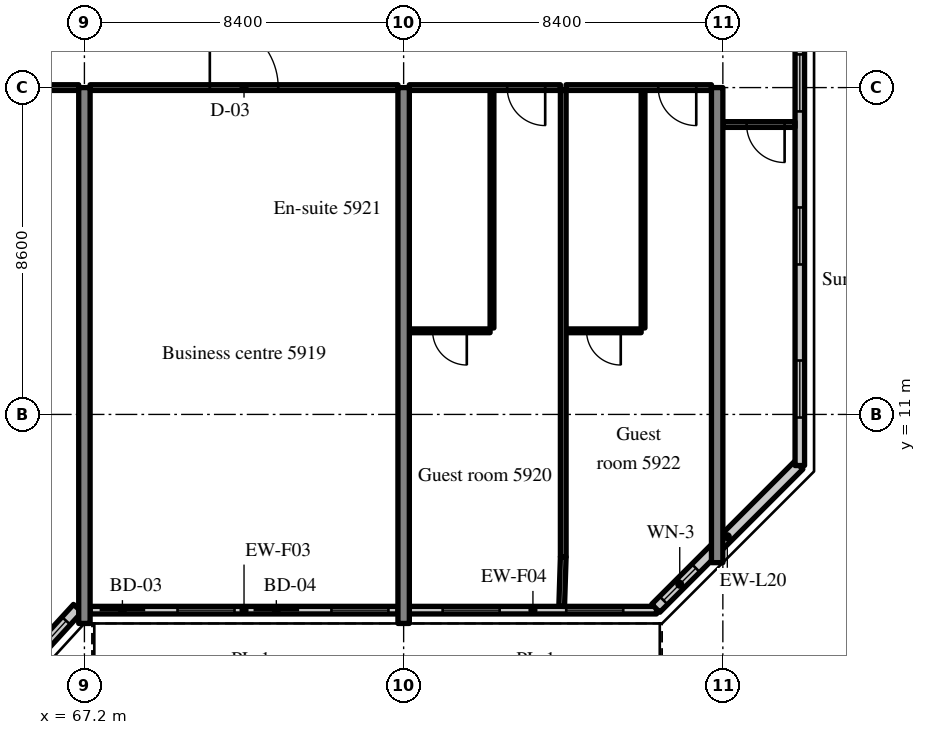
"""IFC4 building model, lengths in metres.
Left out: names, types, materials, properties, quantities, classifications, styles, units other than length and angle.
Written with IfcOpenShell. Run it as: python <this file> out.ifc"""

import sys

from ifc_helpers import new_model, si_unit, direction, frame, frame_2d, origin, place, context, subcontext, project, spatial, rectangle, extrude, source, transform, mapped, element, fill, save


model = new_model("IFC4")
c1 = context("Model", 3, precision=1e-05, world=origin(), true_north=direction((0.0, 1.0)))
c2 = subcontext(c1, "Body", "Model", "MODEL_VIEW")
j1 = project(units=[si_unit("LENGTHUNIT", "METRE"), si_unit("PLANEANGLEUNIT", "RADIAN")], contexts=[c1])
p1 = place(None, origin())
s1 = spatial("IfcSite", under=j1, at=p1, CompositionType="ELEMENT")
p2 = place(p1, origin())
s2 = spatial("IfcBuilding", under=s1, at=p2, CompositionType="ELEMENT")
p3 = place(p2, frame((0.0, 0.0, 245.2)))
s3 = spatial("IfcBuildingStorey", under=s2, at=p3, CompositionType="ELEMENT", Elevation=245.2)
m1 = source(origin(), c2, "Body", "SweptSolid", [
    extrude(rectangle(XDim=14.1, YDim=0.3, at=frame_2d((7.05, 0.0))), origin(), (0.0, 0.0, 1.0), 3.62),
])
for number, where, z_axis, x_axis in (
    (1, (67.2, 5.5, 0.0), (0.0, 0.0, 1.0), (0.0, 1.0, 0.0)),
    (2, (75.6, 5.5, 0.0), (0.0, 0.0, 1.0), (0.0, 1.0, 0.0)),
):
    element("IfcWall", number, at=place(p3, frame(where, z_axis=z_axis, x_axis=x_axis)), inside=s3, PredefinedType="SHEAR", context=c2, shape_type="MappedRepresentation", body=[
        mapped(m1, transform((0.0, 0.0, 0.0), scale=1.0)),
    ])
m2 = source(origin(), c2, "Body", "SweptSolid", [
    extrude(rectangle(XDim=12.5, YDim=0.3, at=frame_2d((6.25, 0.0))), origin(), (0.0, 0.0, 1.0), 3.62),
])
p4 = place(p3, frame((83.85, 7.1, 0.0), z_axis=(0.0, 0.0, 1.0), x_axis=(0.0, 1.0, 0.0)))
e3 = element("IfcWall", 3, at=p4, inside=s3, PredefinedType="SHEAR", context=c2, shape_type="MappedRepresentation", body=[
    mapped(m2, transform((0.0, 0.0, 0.0), scale=1.0)),
])
m3 = source(origin(), c2, "Body", "SweptSolid", [
    extrude(rectangle(XDim=2.398, YDim=0.3, at=frame_2d((1.199, 0.0))), origin(), (0.0, 0.0, 1.0), 3.62),
])
p5 = place(p3, frame((65.404, 4.131, 0.0), z_axis=(0.0, 0.0, 1.0), x_axis=(0.675374189419, 0.737475222815, 0.0)))
e4 = element("IfcWall", 4, at=p5, inside=s3, PredefinedType="SOLIDWALL", context=c2, shape_type="MappedRepresentation", body=[
    mapped(m3, transform((0.0, 0.0, 0.0), scale=1.0)),
])
m4 = source(origin(), c2, "Body", "SweptSolid", [
    extrude(rectangle(XDim=1.5, YDim=2.0, at=frame_2d((0.75, 1.0))), frame((0.0, 0.16, 0.0), z_axis=(0.0, -1.0, 0.0), x_axis=(1.0, 0.0, 0.0)), (0.0, 0.0, 1.0), 0.32),
])
p6 = place(p5, frame((0.449, 0.0, 0.9)))
e5 = element("IfcOpeningElement", 5, at=p6, cuts=e4, PredefinedType="OPENING", context=c2, shape_type="MappedRepresentation", body=[
    mapped(m4, transform((0.0, 0.0, 0.0), scale=1.0)),
])
m5 = source(origin(), c2, "Body", "SweptSolid", [
    extrude(rectangle(XDim=8.1, YDim=0.2, at=frame_2d((4.05, 0.0))), origin(), (0.0, 0.0, 1.0), 3.02),
])
p7 = place(p3, frame((67.35, 5.85, 0.0), z_axis=(0.0, 0.0, 1.0), x_axis=(1.0, 0.0, 0.0)))
e6 = element("IfcWall", 6, at=p7, inside=s3, PredefinedType="SOLIDWALL", context=c2, shape_type="MappedRepresentation", body=[
    mapped(m5, transform((0.0, 0.0, 0.0), scale=1.0)),
])
m6 = source(origin(), c2, "Body", "SweptSolid", [
    extrude(rectangle(XDim=1.2, YDim=2.4, at=frame_2d((0.6, 1.2))), frame((0.0, 0.11, 0.0), z_axis=(0.0, -1.0, 0.0), x_axis=(1.0, 0.0, 0.0)), (0.0, 0.0, 1.0), 0.22),
])
p8 = place(p7, frame((0.25, 0.0, 0.0)))
e7 = element("IfcOpeningElement", 7, at=p8, cuts=e6, PredefinedType="OPENING", context=c2, shape_type="MappedRepresentation", body=[
    mapped(m6, transform((0.0, 0.0, 0.0), scale=1.0)),
])
m7 = source(origin(), c2, "Body", "SweptSolid", [
    extrude(rectangle(XDim=1.5, YDim=1.5, at=frame_2d((0.75, 0.75))), frame((0.0, 0.11, 0.0), z_axis=(0.0, -1.0, 0.0), x_axis=(1.0, 0.0, 0.0)), (0.0, 0.0, 1.0), 0.22),
])
p9 = place(p7, frame((2.3, 0.0, 0.9)))
e8 = element("IfcOpeningElement", 8, at=p9, cuts=e6, PredefinedType="OPENING", context=c2, shape_type="MappedRepresentation", body=[
    mapped(m7, transform((0.0, 0.0, 0.0), scale=1.0)),
])
p10 = place(p7, frame((4.3, 0.0, 0.0)))
e9 = element("IfcOpeningElement", 9, at=p10, cuts=e6, PredefinedType="OPENING", context=c2, shape_type="MappedRepresentation", body=[
    mapped(m6, transform((0.0, 0.0, 0.0), scale=1.0)),
])
p11 = place(p7, frame((6.35, 0.0, 0.9)))
e10 = element("IfcOpeningElement", 10, at=p11, cuts=e6, PredefinedType="OPENING", context=c2, shape_type="MappedRepresentation", body=[
    mapped(m7, transform((0.0, 0.0, 0.0), scale=1.0)),
])
m8 = source(origin(), c2, "Body", "SweptSolid", [
    extrude(rectangle(XDim=6.505, YDim=0.2, at=frame_2d((3.252, 0.0))), origin(), (0.0, 0.0, 1.0), 3.02),
])
p12 = place(p3, frame((75.75, 5.85, 0.0), z_axis=(0.0, 0.0, 1.0), x_axis=(1.0, 0.0, 0.0)))
e11 = element("IfcWall", 11, at=p12, inside=s3, PredefinedType="SOLIDWALL", context=c2, shape_type="MappedRepresentation", body=[
    mapped(m8, transform((0.0, 0.0, 0.0), scale=1.0)),
])
p13 = place(p12, frame((0.876, 0.0, 0.9)))
e12 = element("IfcOpeningElement", 12, at=p13, cuts=e11, PredefinedType="OPENING", context=c2, shape_type="MappedRepresentation", body=[
    mapped(m7, transform((0.0, 0.0, 0.0), scale=1.0)),
])
p14 = place(p12, frame((4.129, 0.0, 0.9)))
e13 = element("IfcOpeningElement", 13, at=p14, cuts=e11, PredefinedType="OPENING", context=c2, shape_type="MappedRepresentation", body=[
    mapped(m7, transform((0.0, 0.0, 0.0), scale=1.0)),
])
m9 = source(origin(), c2, "Body", "SweptSolid", [
    extrude(rectangle(XDim=5.326, YDim=0.3, at=frame_2d((2.663, 0.0))), origin(), (0.0, 0.0, 1.0), 3.62),
])
p15 = place(p3, frame((82.234, 5.9, 0.0), z_axis=(0.0, 0.0, 1.0), x_axis=(0.707083859269, 0.707129702361, 0.0)))
e14 = element("IfcWall", 14, at=p15, inside=s3, PredefinedType="SOLIDWALL", context=c2, shape_type="MappedRepresentation", body=[
    mapped(m9, transform((0.0, 0.0, 0.0), scale=1.0)),
])
m10 = source(origin(), c2, "Body", "SweptSolid", [
    extrude(rectangle(XDim=1.2, YDim=1.5, at=frame_2d((0.6, 0.75))), frame((0.0, 0.16, 0.0), z_axis=(0.0, -1.0, 0.0), x_axis=(1.0, 0.0, 0.0)), (0.0, 0.0, 1.0), 0.32),
])
p16 = place(p15, frame((0.292, 0.0, 0.9)))
e15 = element("IfcOpeningElement", 15, at=p16, cuts=e14, PredefinedType="OPENING", context=c2, shape_type="MappedRepresentation", body=[
    mapped(m10, transform((0.0, 0.0, 0.0), scale=1.0)),
])
m11 = source(origin(), c2, "Body", "SweptSolid", [
    extrude(rectangle(XDim=28.189, YDim=0.25, at=frame_2d((14.095, 0.0))), origin(), (0.0, 0.0, 1.0), 3.62),
])
p17 = place(p3, frame((86.025, 9.655, 0.0), z_axis=(0.0, 0.0, 1.0), x_axis=(0.0, 1.0, 0.0)))
e16 = element("IfcWall", 16, at=p17, inside=s3, PredefinedType="SOLIDWALL", context=c2, shape_type="MappedRepresentation", body=[
    mapped(m11, transform((0.0, 0.0, 0.0), scale=1.0)),
])
m12 = source(origin(), c2, "Body", "SweptSolid", [
    extrude(rectangle(XDim=1.5, YDim=1.5, at=frame_2d((0.75, 0.75))), frame((0.0, 0.135, 0.0), z_axis=(0.0, -1.0, 0.0), x_axis=(1.0, 0.0, 0.0)), (0.0, 0.0, 1.0), 0.27),
])
p18 = place(p17, frame((1.263, 0.0, 0.9)))
e17 = element("IfcOpeningElement", 17, at=p18, cuts=e16, PredefinedType="OPENING", context=c2, shape_type="MappedRepresentation", body=[
    mapped(m12, transform((0.0, 0.0, 0.0), scale=1.0)),
])
p19 = place(p17, frame((5.291, 0.0, 0.9)))
e18 = element("IfcOpeningElement", 18, at=p19, cuts=e16, PredefinedType="OPENING", context=c2, shape_type="MappedRepresentation", body=[
    mapped(m12, transform((0.0, 0.0, 0.0), scale=1.0)),
])
p20 = place(p17, frame((9.318, 0.0, 0.9)))
e19 = element("IfcOpeningElement", 19, at=p20, cuts=e16, PredefinedType="OPENING", context=c2, shape_type="MappedRepresentation", body=[
    mapped(m12, transform((0.0, 0.0, 0.0), scale=1.0)),
])
p21 = place(p17, frame((13.345, 0.0, 0.9)))
e20 = element("IfcOpeningElement", 20, at=p21, cuts=e16, PredefinedType="OPENING", context=c2, shape_type="MappedRepresentation", body=[
    mapped(m12, transform((0.0, 0.0, 0.0), scale=1.0)),
])
p22 = place(p17, frame((17.372, 0.0, 0.9)))
e21 = element("IfcOpeningElement", 21, at=p22, cuts=e16, PredefinedType="OPENING", context=c2, shape_type="MappedRepresentation", body=[
    mapped(m12, transform((0.0, 0.0, 0.0), scale=1.0)),
])
p23 = place(p17, frame((21.399, 0.0, 0.9)))
e22 = element("IfcOpeningElement", 22, at=p23, cuts=e16, PredefinedType="OPENING", context=c2, shape_type="MappedRepresentation", body=[
    mapped(m12, transform((0.0, 0.0, 0.0), scale=1.0)),
])
p24 = place(p17, frame((25.426, 0.0, 0.9)))
e23 = element("IfcOpeningElement", 23, at=p24, cuts=e16, PredefinedType="OPENING", context=c2, shape_type="MappedRepresentation", body=[
    mapped(m12, transform((0.0, 0.0, 0.0), scale=1.0)),
])
m13 = source(origin(), c2, "Body", "SweptSolid", [
    extrude(rectangle(XDim=3.975, YDim=0.15, at=frame_2d((1.988, 0.0))), origin(), (0.0, 0.0, 1.0), 2.92),
])
p25 = place(p3, frame((63.075, 19.6, 0.0), z_axis=(0.0, 0.0, 1.0), x_axis=(1.0, 0.0, 0.0)))
e24 = element("IfcWall", 24, at=p25, inside=s3, PredefinedType="PARTITIONING", context=c2, shape_type="MappedRepresentation", body=[
    mapped(m13, transform((0.0, 0.0, 0.0), scale=1.0)),
])
m14 = source(origin(), c2, "Body", "SweptSolid", [
    extrude(rectangle(XDim=1.0, YDim=2.1, at=frame_2d((0.5, 1.05))), frame((0.0, 0.085, 0.0), z_axis=(0.0, -1.0, 0.0), x_axis=(1.0, 0.0, 0.0)), (0.0, 0.0, 1.0), 0.17),
])
p26 = place(p25, frame((1.487, 0.0, 0.0)))
e25 = element("IfcOpeningElement", 25, at=p26, cuts=e24, PredefinedType="OPENING", context=c2, shape_type="MappedRepresentation", body=[
    mapped(m14, transform((0.0, 0.0, 0.0), scale=1.0)),
])
m15 = source(origin(), c2, "Body", "SweptSolid", [
    extrude(rectangle(XDim=8.1, YDim=0.15, at=frame_2d((4.05, 0.0))), origin(), (0.0, 0.0, 1.0), 2.92),
])
p27 = place(p3, frame((67.35, 19.6, 0.0), z_axis=(0.0, 0.0, 1.0), x_axis=(1.0, 0.0, 0.0)))
e26 = element("IfcWall", 26, at=p27, inside=s3, PredefinedType="PARTITIONING", context=c2, shape_type="MappedRepresentation", body=[
    mapped(m15, transform((0.0, 0.0, 0.0), scale=1.0)),
])
m16 = source(origin(), c2, "Body", "SweptSolid", [
    extrude(rectangle(XDim=1.8, YDim=2.1, at=frame_2d((0.9, 1.05))), frame((0.0, 0.085, 0.0), z_axis=(0.0, -1.0, 0.0), x_axis=(1.0, 0.0, 0.0)), (0.0, 0.0, 1.0), 0.17),
])
p28 = place(p27, frame((3.15, 0.0, 0.0)))
e27 = element("IfcOpeningElement", 27, at=p28, cuts=e26, PredefinedType="OPENING", context=c2, shape_type="MappedRepresentation", body=[
    mapped(m16, transform((0.0, 0.0, 0.0), scale=1.0)),
])
m17 = source(origin(), c2, "Body", "SweptSolid", [
    extrude(rectangle(XDim=6.25, YDim=0.1, at=frame_2d((3.125, 0.0))), origin(), (0.0, 0.0, 1.0), 3.62),
])
p29 = place(p3, frame((77.925, 13.275, 0.0), z_axis=(0.0, 0.0, 1.0), x_axis=(0.0, 1.0, 0.0)))
e28 = element("IfcWall", 28, at=p29, inside=s3, PredefinedType="PARTITIONING", context=c2, shape_type="MappedRepresentation", body=[
    mapped(m17, transform((0.0, 0.0, 0.0), scale=1.0)),
])
m18 = source(origin(), c2, "Body", "SweptSolid", [
    extrude(rectangle(XDim=2.125, YDim=0.1, at=frame_2d((1.062, 0.0))), origin(), (0.0, 0.0, 1.0), 3.62),
])
p30 = place(p3, frame((75.75, 13.2, 0.0), z_axis=(0.0, 0.0, 1.0), x_axis=(1.0, 0.0, 0.0)))
e29 = element("IfcWall", 29, at=p30, inside=s3, PredefinedType="PARTITIONING", context=c2, shape_type="MappedRepresentation", body=[
    mapped(m18, transform((0.0, 0.0, 0.0), scale=1.0)),
])
m19 = source(origin(), c2, "Body", "SweptSolid", [
    extrude(rectangle(XDim=0.9, YDim=2.1, at=frame_2d((0.45, 1.05))), frame((0.0, 0.06, 0.0), z_axis=(0.0, -1.0, 0.0), x_axis=(1.0, 0.0, 0.0)), (0.0, 0.0, 1.0), 0.12),
])
p31 = place(p30, frame((0.612, 0.0, 0.0)))
e30 = element("IfcOpeningElement", 30, at=p31, cuts=e29, PredefinedType="OPENING", context=c2, shape_type="MappedRepresentation", body=[
    mapped(m19, transform((0.0, 0.0, 0.0), scale=1.0)),
])
p32 = place(p3, frame((75.75, 19.6, 0.0), z_axis=(0.0, 0.0, 1.0), x_axis=(1.0, 0.0, 0.0)))
e31 = element("IfcWall", 31, at=p32, inside=s3, PredefinedType="PARTITIONING", context=c2, shape_type="MappedRepresentation", body=[
    mapped(m13, transform((0.0, 0.0, 0.0), scale=1.0)),
])
p33 = place(p32, frame((2.575, 0.0, 0.0)))
e32 = element("IfcOpeningElement", 32, at=p33, cuts=e31, PredefinedType="OPENING", context=c2, shape_type="MappedRepresentation", body=[
    mapped(m14, transform((0.0, 0.0, 0.0), scale=1.0)),
])
p34 = place(p3, frame((81.9, 13.275, 0.0), z_axis=(0.0, 0.0, 1.0), x_axis=(0.0, 1.0, 0.0)))
e33 = element("IfcWall", 33, at=p34, inside=s3, PredefinedType="PARTITIONING", context=c2, shape_type="MappedRepresentation", body=[
    mapped(m17, transform((0.0, 0.0, 0.0), scale=1.0)),
])
m20 = source(origin(), c2, "Body", "SweptSolid", [
    extrude(rectangle(XDim=1.975, YDim=0.1, at=frame_2d((0.988, 0.0))), origin(), (0.0, 0.0, 1.0), 3.62),
])
p35 = place(p3, frame((79.875, 13.2, 0.0), z_axis=(0.0, 0.0, 1.0), x_axis=(1.0, 0.0, 0.0)))
e34 = element("IfcWall", 34, at=p35, inside=s3, PredefinedType="PARTITIONING", context=c2, shape_type="MappedRepresentation", body=[
    mapped(m20, transform((0.0, 0.0, 0.0), scale=1.0)),
])
p36 = place(p35, frame((0.538, 0.0, 0.0)))
e35 = element("IfcOpeningElement", 35, at=p36, cuts=e34, PredefinedType="OPENING", context=c2, shape_type="MappedRepresentation", body=[
    mapped(m19, transform((0.0, 0.0, 0.0), scale=1.0)),
])
m21 = source(origin(), c2, "Body", "SweptSolid", [
    extrude(rectangle(XDim=3.825, YDim=0.15, at=frame_2d((1.913, 0.0))), origin(), (0.0, 0.0, 1.0), 2.92),
])
p37 = place(p3, frame((79.875, 19.6, 0.0), z_axis=(0.0, 0.0, 1.0), x_axis=(1.0, 0.0, 0.0)))
e36 = element("IfcWall", 36, at=p37, inside=s3, PredefinedType="PARTITIONING", context=c2, shape_type="MappedRepresentation", body=[
    mapped(m21, transform((0.0, 0.0, 0.0), scale=1.0)),
])
p38 = place(p37, frame((2.425, 0.0, 0.0)))
e37 = element("IfcOpeningElement", 37, at=p38, cuts=e36, PredefinedType="OPENING", context=c2, shape_type="MappedRepresentation", body=[
    mapped(m14, transform((0.0, 0.0, 0.0), scale=1.0)),
])
m22 = source(origin(), c2, "Body", "SweptSolid", [
    extrude(rectangle(XDim=12.275, YDim=0.15, at=frame_2d((6.137, 0.0))), origin(), (0.0, 0.0, 1.0), 3.62),
])
p39 = place(p3, frame((79.8, 7.25, 0.0), z_axis=(0.0, 0.0, 1.0), x_axis=(0.0, 1.0, 0.0)))
e38 = element("IfcWall", 38, at=p39, inside=s3, PredefinedType="PARTITIONING", context=c2, shape_type="MappedRepresentation", body=[
    mapped(m22, transform((0.0, 0.0, 0.0), scale=1.0)),
])
m23 = source(origin(), c2, "Body", "SweptSolid", [
    extrude(rectangle(XDim=1.9, YDim=0.15, at=frame_2d((0.95, 0.0))), origin(), (0.0, 0.0, 1.0), 2.92),
])
p40 = place(p3, frame((84.0, 18.628, 0.0), z_axis=(0.0, 0.0, 1.0), x_axis=(1.0, 0.0, 0.0)))
e39 = element("IfcWall", 39, at=p40, inside=s3, PredefinedType="PARTITIONING", context=c2, shape_type="MappedRepresentation", body=[
    mapped(m23, transform((0.0, 0.0, 0.0), scale=1.0)),
])
p41 = place(p40, frame((0.625, 0.0, 0.0)))
e40 = element("IfcOpeningElement", 40, at=p41, cuts=e39, PredefinedType="OPENING", context=c2, shape_type="MappedRepresentation", body=[
    mapped(m14, transform((0.0, 0.0, 0.0), scale=1.0)),
])
m24 = source(origin(), c2, "Body", "SweptSolid", [
    extrude(rectangle(XDim=1.301, YDim=0.15, at=frame_2d((0.65, 0.0))), origin(), (0.0, 0.0, 1.0), 3.62),
])
p42 = place(p3, frame((79.759, 5.95, 0.0), z_axis=(0.0, 0.0, 1.0), x_axis=(0.031533606063, 0.999502692187, 0.0)))
e41 = element("IfcWall", 41, at=p42, inside=s3, PredefinedType="PARTITIONING", context=c2, shape_type="MappedRepresentation", body=[
    mapped(m24, transform((0.0, 0.0, 0.0), scale=1.0)),
])
m25 = source(origin(), c2, "Body", "SweptSolid", [
    extrude(rectangle(XDim=1.5, YDim=2.0, at=frame_2d((0.75, 1.0))), frame((0.0, 0.03, 0.0), z_axis=(0.0, -1.0, 0.0), x_axis=(1.0, 0.0, 0.0)), (0.0, 0.0, 1.0), 0.06),
])
p43 = place(p6, origin())
e42 = element("IfcWindow", 42, at=p43, inside=s3, PartitioningType="SINGLE_PANEL", PredefinedType="WINDOW", context=c2, shape_type="MappedRepresentation", body=[
    mapped(m25, transform((0.0, 0.0, 0.0), scale=1.0)),
])
fill(e5, e42)
m26 = source(origin(), c2, "Body", "SweptSolid", [
    extrude(rectangle(XDim=1.2, YDim=2.4, at=frame_2d((0.6, 1.2))), frame((0.0, 0.025, 0.0), z_axis=(0.0, -1.0, 0.0), x_axis=(1.0, 0.0, 0.0)), (0.0, 0.0, 1.0), 0.05),
])
p44 = place(p8, origin())
e43 = element("IfcDoor", 43, at=p44, inside=s3, OperationType="SLIDING_TO_LEFT", PredefinedType="DOOR", context=c2, shape_type="MappedRepresentation", body=[
    mapped(m26, transform((0.0, 0.0, 0.0), scale=1.0)),
])
fill(e7, e43)
m27 = source(origin(), c2, "Body", "SweptSolid", [
    extrude(rectangle(XDim=1.5, YDim=1.5, at=frame_2d((0.75, 0.75))), frame((0.0, 0.03, 0.0), z_axis=(0.0, -1.0, 0.0), x_axis=(1.0, 0.0, 0.0)), (0.0, 0.0, 1.0), 0.06),
])
p45 = place(p9, origin())
e44 = element("IfcWindow", 44, at=p45, inside=s3, PartitioningType="SINGLE_PANEL", PredefinedType="WINDOW", context=c2, shape_type="MappedRepresentation", body=[
    mapped(m27, transform((0.0, 0.0, 0.0), scale=1.0)),
])
fill(e8, e44)
p46 = place(p10, origin())
e45 = element("IfcDoor", 45, at=p46, inside=s3, OperationType="SLIDING_TO_RIGHT", PredefinedType="DOOR", context=c2, shape_type="MappedRepresentation", body=[
    mapped(m26, transform((0.0, 0.0, 0.0), scale=1.0)),
])
fill(e9, e45)
p47 = place(p11, origin())
e46 = element("IfcWindow", 46, at=p47, inside=s3, PartitioningType="SINGLE_PANEL", PredefinedType="WINDOW", context=c2, shape_type="MappedRepresentation", body=[
    mapped(m27, transform((0.0, 0.0, 0.0), scale=1.0)),
])
fill(e10, e46)
p48 = place(p13, origin())
e47 = element("IfcWindow", 47, at=p48, inside=s3, PartitioningType="SINGLE_PANEL", PredefinedType="WINDOW", context=c2, shape_type="MappedRepresentation", body=[
    mapped(m27, transform((0.0, 0.0, 0.0), scale=1.0)),
])
fill(e12, e47)
p49 = place(p14, origin())
e48 = element("IfcWindow", 48, at=p49, inside=s3, PartitioningType="SINGLE_PANEL", PredefinedType="WINDOW", context=c2, shape_type="MappedRepresentation", body=[
    mapped(m27, transform((0.0, 0.0, 0.0), scale=1.0)),
])
fill(e13, e48)
m28 = source(origin(), c2, "Body", "SweptSolid", [
    extrude(rectangle(XDim=1.2, YDim=1.5, at=frame_2d((0.6, 0.75))), frame((0.0, 0.03, 0.0), z_axis=(0.0, -1.0, 0.0), x_axis=(1.0, 0.0, 0.0)), (0.0, 0.0, 1.0), 0.06),
])
p50 = place(p16, origin())
e49 = element("IfcWindow", 49, at=p50, inside=s3, PartitioningType="SINGLE_PANEL", PredefinedType="WINDOW", context=c2, shape_type="MappedRepresentation", body=[
    mapped(m28, transform((0.0, 0.0, 0.0), scale=1.0)),
])
fill(e15, e49)
p51 = place(p18, origin())
e50 = element("IfcWindow", 50, at=p51, inside=s3, PartitioningType="SINGLE_PANEL", PredefinedType="WINDOW", context=c2, shape_type="MappedRepresentation", body=[
    mapped(m27, transform((0.0, 0.0, 0.0), scale=1.0)),
])
fill(e17, e50)
p52 = place(p19, origin())
e51 = element("IfcWindow", 51, at=p52, inside=s3, PartitioningType="SINGLE_PANEL", PredefinedType="WINDOW", context=c2, shape_type="MappedRepresentation", body=[
    mapped(m27, transform((0.0, 0.0, 0.0), scale=1.0)),
])
fill(e18, e51)
p53 = place(p20, origin())
e52 = element("IfcWindow", 52, at=p53, inside=s3, PartitioningType="SINGLE_PANEL", PredefinedType="WINDOW", context=c2, shape_type="MappedRepresentation", body=[
    mapped(m27, transform((0.0, 0.0, 0.0), scale=1.0)),
])
fill(e19, e52)
m29 = source(origin(), c2, "Body", "SweptSolid", [
    extrude(rectangle(XDim=1.8, YDim=2.1, at=frame_2d((0.9, 1.05))), frame((0.0, 0.025, 0.0), z_axis=(0.0, -1.0, 0.0), x_axis=(1.0, 0.0, 0.0)), (0.0, 0.0, 1.0), 0.05),
])
p54 = place(p28, origin())
e53 = element("IfcDoor", 53, at=p54, inside=s3, OperationType="DOUBLE_DOOR_SINGLE_SWING", PredefinedType="DOOR", context=c2, shape_type="MappedRepresentation", body=[
    mapped(m29, transform((0.0, 0.0, 0.0), scale=1.0)),
])
fill(e27, e53)
m30 = source(origin(), c2, "Body", "SweptSolid", [
    extrude(rectangle(XDim=0.9, YDim=2.1, at=frame_2d((0.45, 1.05))), frame((0.0, 0.025, 0.0), z_axis=(0.0, -1.0, 0.0), x_axis=(1.0, 0.0, 0.0)), (0.0, 0.0, 1.0), 0.05),
])
p55 = place(p31, origin())
e54 = element("IfcDoor", 54, at=p55, inside=s3, OperationType="SINGLE_SWING_RIGHT", PredefinedType="DOOR", context=c2, shape_type="MappedRepresentation", body=[
    mapped(m30, transform((0.0, 0.0, 0.0), scale=1.0)),
])
fill(e30, e54)
m31 = source(origin(), c2, "Body", "SweptSolid", [
    extrude(rectangle(XDim=1.0, YDim=2.1, at=frame_2d((0.5, 1.05))), frame((0.0, 0.025, 0.0), z_axis=(0.0, -1.0, 0.0), x_axis=(1.0, 0.0, 0.0)), (0.0, 0.0, 1.0), 0.05),
])
p56 = place(p33, origin())
e55 = element("IfcDoor", 55, at=p56, inside=s3, OperationType="SINGLE_SWING_RIGHT", PredefinedType="DOOR", context=c2, shape_type="MappedRepresentation", body=[
    mapped(m31, transform((0.0, 0.0, 0.0), scale=1.0)),
])
fill(e32, e55)
p57 = place(p36, origin())
e56 = element("IfcDoor", 56, at=p57, inside=s3, OperationType="SINGLE_SWING_RIGHT", PredefinedType="DOOR", context=c2, shape_type="MappedRepresentation", body=[
    mapped(m30, transform((0.0, 0.0, 0.0), scale=1.0)),
])
fill(e35, e56)
p58 = place(p38, origin())
e57 = element("IfcDoor", 57, at=p58, inside=s3, OperationType="SINGLE_SWING_RIGHT", PredefinedType="DOOR", context=c2, shape_type="MappedRepresentation", body=[
    mapped(m31, transform((0.0, 0.0, 0.0), scale=1.0)),
])
fill(e37, e57)
p59 = place(p41, origin())
e58 = element("IfcDoor", 58, at=p59, inside=s3, OperationType="SINGLE_SWING_RIGHT", PredefinedType="DOOR", context=c2, shape_type="MappedRepresentation", body=[
    mapped(m31, transform((0.0, 0.0, 0.0), scale=1.0)),
])
fill(e40, e58)
save(model, sys.argv[1])
